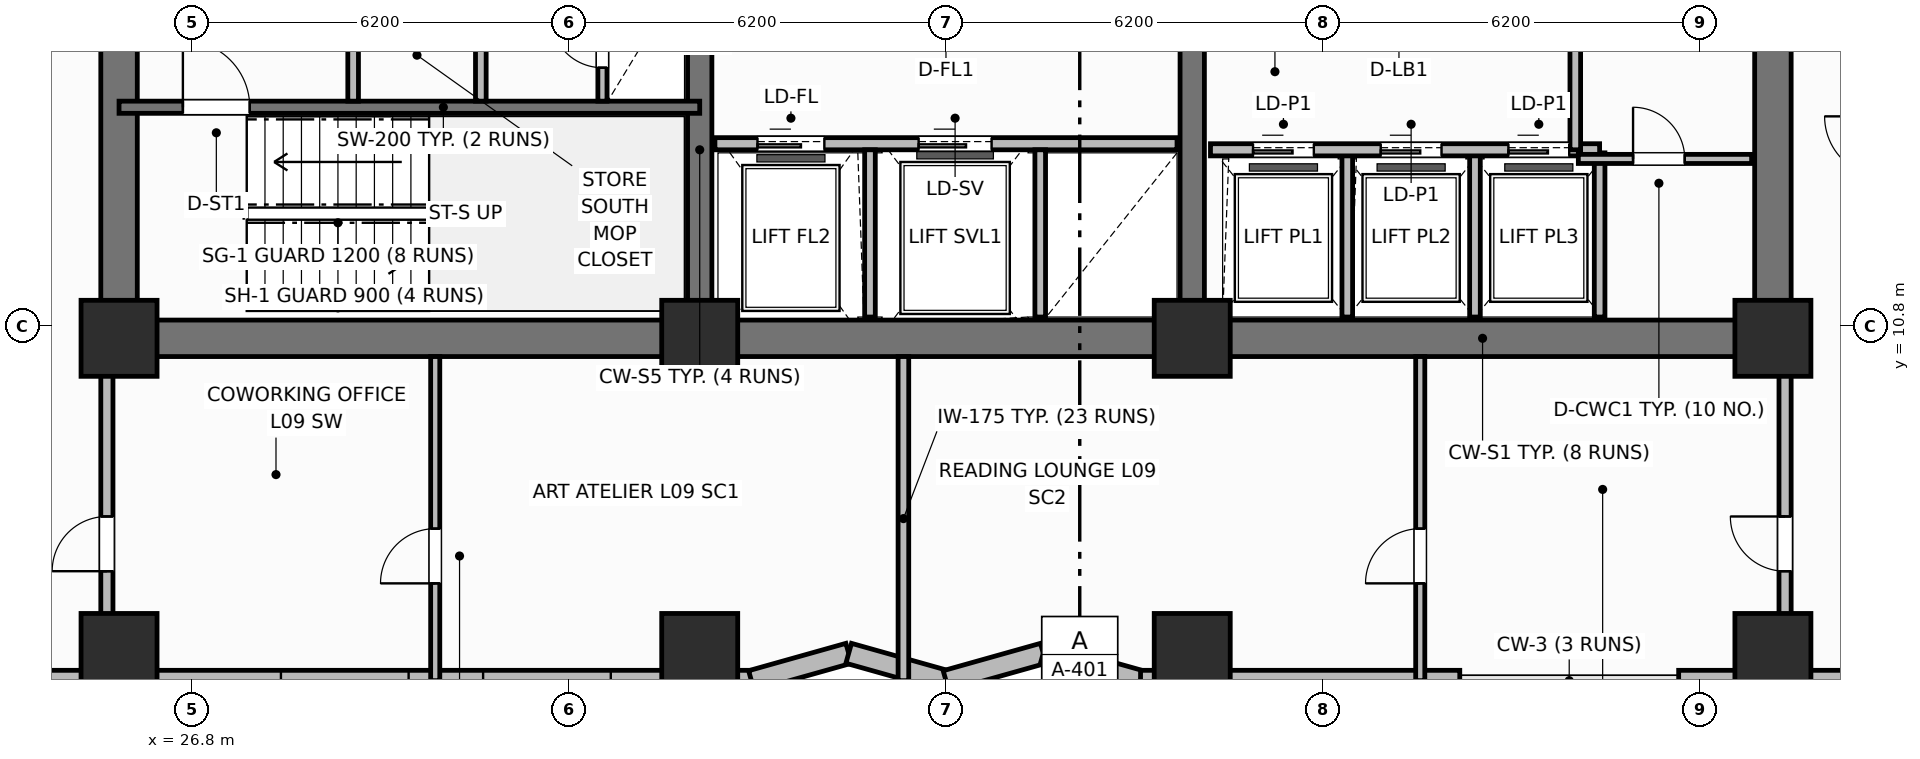
"""IFC4 building model, lengths in metres.
Left out: names, types, materials, properties, quantities, classifications, styles, units other than length and angle.
Written with IfcOpenShell. Run it as: python <this file> out.ifc"""

import sys

from ifc_helpers import new_model, si_unit, direction, frame, frame_2d, origin, origin_2d, place, context, subcontext, project, spatial, rectangle, extrude, element, fill, save


model = new_model("IFC4")
c1 = context("Model", 3, precision=1e-05, world=origin(), true_north=direction((0.0, 1.0)))
c2 = subcontext(c1, "Body", "Model", "MODEL_VIEW")
j1 = project(units=[si_unit("LENGTHUNIT", "METRE"), si_unit("PLANEANGLEUNIT", "RADIAN")], contexts=[c1])
p1 = place(None, origin())
s1 = spatial("IfcSite", under=j1, at=p1, CompositionType="ELEMENT")
p2 = place(p1, origin())
s2 = spatial("IfcBuilding", under=s1, at=p2, CompositionType="ELEMENT")
p3 = place(p2, frame((0.0, 0.0, 39.9)))
s3 = spatial("IfcBuildingStorey", under=s2, at=p3, CompositionType="ELEMENT", Elevation=39.9)
p4 = place(p3, frame((52.8, 10.6, 0.0), z_axis=(0.0, 0.0, 1.0), x_axis=(-1.0, 0.0, 0.0)))
e1 = element("IfcWall", 1, at=p4, inside=s3, PredefinedType="SHEAR", context=c2, shape_type="SweptSolid", body=[
    extrude(rectangle(XDim=27.2, YDim=0.6, at=frame_2d((13.6, 0.0))), origin(), (0.0, 0.0, 1.0), 3.7),
])
for number, where, z_axis, x_axis in (
    (2, (25.6, 10.9, 0.0), (0.0, 0.0, 1.0), (0.0, 1.0, 0.0)),
    (3, (52.8, 10.9, 0.0), (0.0, 0.0, 1.0), (0.0, 1.0, 0.0)),
):
    element("IfcWall", number, at=place(p3, frame(where, z_axis=z_axis, x_axis=x_axis)), inside=s3, PredefinedType="SHEAR", context=c2, shape_type="SweptSolid", body=[
        extrude(rectangle(XDim=5.6, YDim=0.6, at=frame_2d((2.8, 0.0))), origin(), (0.0, 0.0, 1.0), 3.7),
    ])
for number, where, z_axis, x_axis in (
    (4, (35.15, 10.9, 0.0), (0.0, 0.0, 1.0), (0.0, 1.0, 0.0)),
    (5, (43.25, 10.9, 0.0), (0.0, 0.0, 1.0), (0.0, 1.0, 0.0)),
):
    element("IfcWall", number, at=place(p3, frame(where, z_axis=z_axis, x_axis=x_axis)), inside=s3, PredefinedType="SHEAR", context=c2, shape_type="SweptSolid", body=[
        extrude(rectangle(XDim=5.6, YDim=0.4, at=frame_2d((2.8, 0.0))), origin(), (0.0, 0.0, 1.0), 3.7),
    ])
for number, where, z_axis, x_axis in (
    (6, (25.6, 10.6, 0.0), (0.0, 0.0, 1.0), (1.0, 0.0, 0.0)),
    (7, (35.15, 10.6, 0.0), (0.0, 0.0, 1.0), (1.0, 0.0, 0.0)),
    (8, (43.25, 10.6, 0.0), (0.0, 0.0, 1.0), (1.0, 0.0, 0.0)),
    (9, (52.8, 10.6, 0.0), (0.0, 0.0, 1.0), (1.0, 0.0, 0.0)),
    (10, (25.6, 5.45, 0.0), (0.0, 0.0, 1.0), (1.0, 0.0, 0.0)),
    (11, (35.15, 5.45, 0.0), (0.0, 0.0, 1.0), (1.0, 0.0, 0.0)),
    (12, (43.25, 5.45, 0.0), (0.0, 0.0, 1.0), (1.0, 0.0, 0.0)),
    (13, (52.8, 5.45, 0.0), (0.0, 0.0, 1.0), (1.0, 0.0, 0.0)),
):
    element("IfcColumn", number, at=place(p3, frame(where, z_axis=z_axis, x_axis=x_axis)), inside=s3, PredefinedType="COLUMN", context=c2, shape_type="SweptSolid", body=[
        extrude(rectangle(XDim=1.25, YDim=1.25, at=origin_2d()), origin(), (0.0, 0.0, 1.0), 3.7),
    ])
p5 = place(p3, frame((18.6, 4.97, 0.0), z_axis=(0.0, 0.0, 1.0), x_axis=(1.0, 0.0, 0.0)))
e14 = element("IfcWall", 14, at=p5, inside=s3, PredefinedType="SOLIDWALL", context=c2, shape_type="SweptSolid", body=[
    extrude(rectangle(XDim=17.4, YDim=0.34, at=frame_2d((8.7, 0.0))), origin(), (0.0, 0.0, 1.0), 2.7),
])
p6 = place(p5, frame((1.613, 0.0, 0.68)))
e15 = element("IfcOpeningElement", 15, at=p6, cuts=e14, PredefinedType="OPENING", context=c2, shape_type="SweptSolid", body=[
    extrude(rectangle(XDim=2.1, YDim=1.9, at=frame_2d((1.05, 0.95))), frame((0.0, 0.18, 0.0), z_axis=(0.0, -1.0, 0.0), x_axis=(1.0, 0.0, 0.0)), (0.0, 0.0, 1.0), 0.36),
])
p7 = place(p5, frame((9.663, 0.0, 0.68)))
e16 = element("IfcOpeningElement", 16, at=p7, cuts=e14, PredefinedType="OPENING", context=c2, shape_type="SweptSolid", body=[
    extrude(rectangle(XDim=2.1, YDim=1.9, at=frame_2d((1.05, 0.95))), frame((0.0, 0.18, 0.0), z_axis=(0.0, -1.0, 0.0), x_axis=(1.0, 0.0, 0.0)), (0.0, 0.0, 1.0), 0.36),
])
p8 = place(p5, frame((12.988, 0.0, 0.68)))
e17 = element("IfcOpeningElement", 17, at=p8, cuts=e14, PredefinedType="OPENING", context=c2, shape_type="SweptSolid", body=[
    extrude(rectangle(XDim=2.1, YDim=1.9, at=frame_2d((1.05, 0.95))), frame((0.0, 0.18, 0.0), z_axis=(0.0, -1.0, 0.0), x_axis=(1.0, 0.0, 0.0)), (0.0, 0.0, 1.0), 0.36),
])
p9 = place(p3, frame((36.0, 4.97, 0.0), z_axis=(0.0, 0.0, 1.0), x_axis=(0.962662902433, 0.270703040766, 0.0)))
e18 = element("IfcWall", 18, at=p9, inside=s3, PredefinedType="SOLIDWALL", context=c2, shape_type="SweptSolid", body=[
    extrude(rectangle(XDim=1.662, YDim=0.34, at=frame_2d((0.831, 0.0))), origin(), (0.0, 0.0, 1.0), 2.7),
])
p10 = place(p3, frame((37.6, 5.42, 0.0), z_axis=(0.0, 0.0, 1.0), x_axis=(0.962652136636, -0.270741322725, 0.0)))
e19 = element("IfcWall", 19, at=p10, inside=s3, PredefinedType="SOLIDWALL", context=c2, shape_type="SweptSolid", body=[
    extrude(rectangle(XDim=1.662, YDim=0.34, at=frame_2d((0.831, 0.0))), origin(), (0.0, 0.0, 1.0), 2.7),
])
p11 = place(p3, frame((39.2, 4.97, 0.0), z_axis=(0.0, 0.0, 1.0), x_axis=(0.962662902433, 0.270703040766, 0.0)))
e20 = element("IfcWall", 20, at=p11, inside=s3, PredefinedType="SOLIDWALL", context=c2, shape_type="SweptSolid", body=[
    extrude(rectangle(XDim=1.662, YDim=0.34, at=frame_2d((0.831, 0.0))), origin(), (0.0, 0.0, 1.0), 2.7),
])
p12 = place(p3, frame((40.8, 5.42, 0.0), z_axis=(0.0, 0.0, 1.0), x_axis=(0.962652136636, -0.270741322725, 0.0)))
e21 = element("IfcWall", 21, at=p12, inside=s3, PredefinedType="SOLIDWALL", context=c2, shape_type="SweptSolid", body=[
    extrude(rectangle(XDim=1.662, YDim=0.34, at=frame_2d((0.831, 0.0))), origin(), (0.0, 0.0, 1.0), 2.7),
])
p13 = place(p3, frame((42.4, 4.97, 0.0), z_axis=(0.0, 0.0, 1.0), x_axis=(1.0, 0.0, 0.0)))
e22 = element("IfcWall", 22, at=p13, inside=s3, PredefinedType="SOLIDWALL", context=c2, shape_type="SweptSolid", body=[
    extrude(rectangle(XDim=5.25, YDim=0.34, at=frame_2d((2.625, 0.0))), origin(), (0.0, 0.0, 1.0), 2.7),
])
p14 = place(p3, frame((51.25, 4.97, 0.0), z_axis=(0.0, 0.0, 1.0), x_axis=(1.0, 0.0, 0.0)))
e23 = element("IfcWall", 23, at=p14, inside=s3, PredefinedType="SOLIDWALL", context=c2, shape_type="SweptSolid", body=[
    extrude(rectangle(XDim=8.55, YDim=0.34, at=frame_2d((4.275, 0.0))), origin(), (0.0, 0.0, 1.0), 2.7),
])
p15 = place(p14, frame((5.038, 0.0, 0.68)))
e24 = element("IfcOpeningElement", 24, at=p15, cuts=e23, PredefinedType="OPENING", context=c2, shape_type="SweptSolid", body=[
    extrude(rectangle(XDim=2.1, YDim=1.9, at=frame_2d((1.05, 0.95))), frame((0.0, 0.18, 0.0), z_axis=(0.0, -1.0, 0.0), x_axis=(1.0, 0.0, 0.0)), (0.0, 0.0, 1.0), 0.36),
])
p16 = place(p3, frame((25.6, 14.4, 0.0), z_axis=(0.0, 0.0, 1.0), x_axis=(1.0, 0.0, 0.0)))
e25 = element("IfcWall", 25, at=p16, inside=s3, PredefinedType="SHEAR", context=c2, shape_type="SweptSolid", body=[
    extrude(rectangle(XDim=9.55, YDim=0.2, at=frame_2d((4.775, 0.0))), origin(), (0.0, 0.0, 1.0), 3.7),
])
p17 = place(p16, frame((1.05, 0.0, 0.0)))
e26 = element("IfcOpeningElement", 26, at=p17, cuts=e25, PredefinedType="OPENING", context=c2, shape_type="SweptSolid", body=[
    extrude(rectangle(XDim=1.1, YDim=2.15, at=frame_2d((0.55, 1.075))), frame((0.0, 0.11, 0.0), z_axis=(0.0, -1.0, 0.0), x_axis=(1.0, 0.0, 0.0)), (0.0, 0.0, 1.0), 0.22),
])
for number, where, z_axis, x_axis in (
    (27, (29.45, 14.5, 0.0), (0.0, 0.0, 1.0), (0.0, 1.0, 0.0)),
    (28, (31.55, 14.5, 0.0), (0.0, 0.0, 1.0), (0.0, 1.0, 0.0)),
):
    element("IfcWall", number, at=place(p3, frame(where, z_axis=z_axis, x_axis=x_axis)), inside=s3, PredefinedType="PARTITIONING", context=c2, shape_type="SweptSolid", body=[
        extrude(rectangle(XDim=2.08, YDim=0.175, at=frame_2d((1.04, 0.0))), origin(), (0.0, 0.0, 1.0), 2.53),
    ])
p18 = place(p3, frame((33.55, 14.5, 0.0), z_axis=(0.0, 0.0, 1.0), x_axis=(0.0, 1.0, 0.0)))
e29 = element("IfcWall", 29, at=p18, inside=s3, PredefinedType="PARTITIONING", context=c2, shape_type="SweptSolid", body=[
    extrude(rectangle(XDim=2.08, YDim=0.15, at=frame_2d((1.04, 0.0))), origin(), (0.0, 0.0, 1.0), 2.53),
])
p19 = place(p18, frame((0.55, 0.0, 0.0)))
e30 = element("IfcOpeningElement", 30, at=p19, cuts=e29, PredefinedType="OPENING", context=c2, shape_type="SweptSolid", body=[
    extrude(rectangle(XDim=0.85, YDim=2.05, at=frame_2d((0.425, 1.025))), frame((0.0, 0.085, 0.0), z_axis=(0.0, -1.0, 0.0), x_axis=(1.0, 0.0, 0.0)), (0.0, 0.0, 1.0), 0.17),
])
p20 = place(p3, frame((35.4, 13.8, 0.0), z_axis=(0.0, 0.0, 1.0), x_axis=(1.0, 0.0, 0.0)))
e31 = element("IfcWall", 31, at=p20, inside=s3, PredefinedType="PARTITIONING", context=c2, shape_type="SweptSolid", body=[
    extrude(rectangle(XDim=7.6, YDim=0.2, at=frame_2d((3.8, 0.0))), origin(), (0.0, 0.0, 1.0), 2.3),
])
p21 = place(p20, frame((0.7, 0.0, 0.0)))
e32 = element("IfcOpeningElement", 32, at=p21, cuts=e31, PredefinedType="OPENING", context=c2, shape_type="SweptSolid", body=[
    extrude(rectangle(XDim=1.1, YDim=2.15, at=frame_2d((0.55, 1.075))), frame((0.0, 0.11, 0.0), z_axis=(0.0, -1.0, 0.0), x_axis=(1.0, 0.0, 0.0)), (0.0, 0.0, 1.0), 0.22),
])
p22 = place(p20, frame((3.35, 0.0, 0.0)))
e33 = element("IfcOpeningElement", 33, at=p22, cuts=e31, PredefinedType="OPENING", context=c2, shape_type="SweptSolid", body=[
    extrude(rectangle(XDim=1.2, YDim=2.15, at=frame_2d((0.6, 1.075))), frame((0.0, 0.11, 0.0), z_axis=(0.0, -1.0, 0.0), x_axis=(1.0, 0.0, 0.0)), (0.0, 0.0, 1.0), 0.22),
])
for number, where, z_axis, x_axis in (
    (34, (37.95, 10.95, 0.0), (0.0, 0.0, 1.0), (0.0, 1.0, 0.0)),
    (35, (40.75, 10.95, 0.0), (0.0, 0.0, 1.0), (0.0, 1.0, 0.0)),
):
    element("IfcWall", number, at=place(p3, frame(where, z_axis=z_axis, x_axis=x_axis)), inside=s3, PredefinedType="PARTITIONING", context=c2, shape_type="SweptSolid", body=[
        extrude(rectangle(XDim=2.75, YDim=0.175, at=frame_2d((1.375, 0.0))), origin(), (0.0, 0.0, 1.0), 2.53),
    ])
for number, where, z_axis, x_axis in (
    (36, (45.8, 10.95, 0.0), (0.0, 0.0, 1.0), (0.0, 1.0, 0.0)),
    (37, (47.9, 10.95, 0.0), (0.0, 0.0, 1.0), (0.0, 1.0, 0.0)),
    (38, (49.95, 10.95, 0.0), (0.0, 0.0, 1.0), (0.0, 1.0, 0.0)),
):
    element("IfcWall", number, at=place(p3, frame(where, z_axis=z_axis, x_axis=x_axis)), inside=s3, PredefinedType="PARTITIONING", context=c2, shape_type="SweptSolid", body=[
        extrude(rectangle(XDim=2.7, YDim=0.175, at=frame_2d((1.35, 0.0))), origin(), (0.0, 0.0, 1.0), 2.53),
    ])
p23 = place(p3, frame((43.55, 13.7, 0.0), z_axis=(0.0, 0.0, 1.0), x_axis=(1.0, 0.0, 0.0)))
e39 = element("IfcWall", 39, at=p23, inside=s3, PredefinedType="PARTITIONING", context=c2, shape_type="SweptSolid", body=[
    extrude(rectangle(XDim=6.4, YDim=0.2, at=frame_2d((3.2, 0.0))), origin(), (0.0, 0.0, 1.0), 2.53),
])
p24 = place(p23, frame((0.7, 0.0, 0.0)))
e40 = element("IfcOpeningElement", 40, at=p24, cuts=e39, PredefinedType="OPENING", context=c2, shape_type="SweptSolid", body=[
    extrude(rectangle(XDim=1.0, YDim=2.15, at=frame_2d((0.5, 1.075))), frame((0.0, 0.11, 0.0), z_axis=(0.0, -1.0, 0.0), x_axis=(1.0, 0.0, 0.0)), (0.0, 0.0, 1.0), 0.22),
])
p25 = place(p23, frame((2.8, 0.0, 0.0)))
e41 = element("IfcOpeningElement", 41, at=p25, cuts=e39, PredefinedType="OPENING", context=c2, shape_type="SweptSolid", body=[
    extrude(rectangle(XDim=1.0, YDim=2.15, at=frame_2d((0.5, 1.075))), frame((0.0, 0.11, 0.0), z_axis=(0.0, -1.0, 0.0), x_axis=(1.0, 0.0, 0.0)), (0.0, 0.0, 1.0), 0.22),
])
p26 = place(p23, frame((4.9, 0.0, 0.0)))
e42 = element("IfcOpeningElement", 42, at=p26, cuts=e39, PredefinedType="OPENING", context=c2, shape_type="SweptSolid", body=[
    extrude(rectangle(XDim=1.0, YDim=2.15, at=frame_2d((0.5, 1.075))), frame((0.0, 0.11, 0.0), z_axis=(0.0, -1.0, 0.0), x_axis=(1.0, 0.0, 0.0)), (0.0, 0.0, 1.0), 0.22),
])
p27 = place(p3, frame((49.55, 13.7, 0.0), z_axis=(0.0, 0.0, 1.0), x_axis=(0.0, 1.0, 0.0)))
e43 = element("IfcWall", 43, at=p27, inside=s3, PredefinedType="PARTITIONING", context=c2, shape_type="SweptSolid", body=[
    extrude(rectangle(XDim=2.88, YDim=0.175, at=frame_2d((1.44, 0.0))), origin(), (0.0, 0.0, 1.0), 2.53),
])
p28 = place(p3, frame((49.6, 13.55, 0.0), z_axis=(0.0, 0.0, 1.0), x_axis=(1.0, 0.0, 0.0)))
e44 = element("IfcWall", 44, at=p28, inside=s3, PredefinedType="PARTITIONING", context=c2, shape_type="SweptSolid", body=[
    extrude(rectangle(XDim=2.85, YDim=0.15, at=frame_2d((1.425, 0.0))), origin(), (0.0, 0.0, 1.0), 2.53),
])
p29 = place(p28, frame((0.9, 0.0, 0.0)))
e45 = element("IfcOpeningElement", 45, at=p29, cuts=e44, PredefinedType="OPENING", context=c2, shape_type="SweptSolid", body=[
    extrude(rectangle(XDim=0.85, YDim=2.1, at=frame_2d((0.425, 1.05))), frame((0.0, 0.085, 0.0), z_axis=(0.0, -1.0, 0.0), x_axis=(1.0, 0.0, 0.0)), (0.0, 0.0, 1.0), 0.17),
])
p30 = place(p3, frame((30.8, 4.97, 0.0), z_axis=(0.0, 0.0, 1.0), x_axis=(0.0, 1.0, 0.0)))
e46 = element("IfcWall", 46, at=p30, inside=s3, PredefinedType="PARTITIONING", context=c2, shape_type="SweptSolid", body=[
    extrude(rectangle(XDim=5.33, YDim=0.15, at=frame_2d((2.665, 0.0))), origin(), (0.0, 0.0, 1.0), 2.53),
])
p31 = place(p30, frame((1.6, 0.0, 0.0)))
e47 = element("IfcOpeningElement", 47, at=p31, cuts=e46, PredefinedType="OPENING", context=c2, shape_type="SweptSolid", body=[
    extrude(rectangle(XDim=0.9, YDim=2.1, at=frame_2d((0.45, 1.05))), frame((0.0, 0.085, 0.0), z_axis=(0.0, -1.0, 0.0), x_axis=(1.0, 0.0, 0.0)), (0.0, 0.0, 1.0), 0.17),
])
p32 = place(p3, frame((38.5, 4.97, 0.0), z_axis=(0.0, 0.0, 1.0), x_axis=(0.0, 1.0, 0.0)))
e48 = element("IfcWall", 48, at=p32, inside=s3, PredefinedType="PARTITIONING", context=c2, shape_type="SweptSolid", body=[
    extrude(rectangle(XDim=5.33, YDim=0.175, at=frame_2d((2.665, 0.0))), origin(), (0.0, 0.0, 1.0), 2.53),
])
p33 = place(p3, frame((47.0, 4.97, 0.0), z_axis=(0.0, 0.0, 1.0), x_axis=(0.0, 1.0, 0.0)))
e49 = element("IfcWall", 49, at=p33, inside=s3, PredefinedType="PARTITIONING", context=c2, shape_type="SweptSolid", body=[
    extrude(rectangle(XDim=5.33, YDim=0.15, at=frame_2d((2.665, 0.0))), origin(), (0.0, 0.0, 1.0), 2.53),
])
p34 = place(p33, frame((1.6, 0.0, 0.0)))
e50 = element("IfcOpeningElement", 50, at=p34, cuts=e49, PredefinedType="OPENING", context=c2, shape_type="SweptSolid", body=[
    extrude(rectangle(XDim=0.9, YDim=2.1, at=frame_2d((0.45, 1.05))), frame((0.0, 0.085, 0.0), z_axis=(0.0, -1.0, 0.0), x_axis=(1.0, 0.0, 0.0)), (0.0, 0.0, 1.0), 0.17),
])
p35 = place(p3, frame((25.4, 5.92, 0.0), z_axis=(0.0, 0.0, 1.0), x_axis=(0.0, 1.0, 0.0)))
e51 = element("IfcWall", 51, at=p35, inside=s3, PredefinedType="PARTITIONING", context=c2, shape_type="SweptSolid", body=[
    extrude(rectangle(XDim=4.38, YDim=0.2, at=frame_2d((2.19, 0.0))), origin(), (0.0, 0.0, 1.0), 2.53),
])
p36 = place(p35, frame((0.85, 0.0, 0.0)))
e52 = element("IfcOpeningElement", 52, at=p36, cuts=e51, PredefinedType="OPENING", context=c2, shape_type="SweptSolid", body=[
    extrude(rectangle(XDim=0.9, YDim=2.1, at=frame_2d((0.45, 1.05))), frame((0.0, 0.11, 0.0), z_axis=(0.0, -1.0, 0.0), x_axis=(1.0, 0.0, 0.0)), (0.0, 0.0, 1.0), 0.22),
])
p37 = place(p3, frame((53.0, 5.92, 0.0), z_axis=(0.0, 0.0, 1.0), x_axis=(0.0, 1.0, 0.0)))
e53 = element("IfcWall", 53, at=p37, inside=s3, PredefinedType="PARTITIONING", context=c2, shape_type="SweptSolid", body=[
    extrude(rectangle(XDim=4.38, YDim=0.2, at=frame_2d((2.19, 0.0))), origin(), (0.0, 0.0, 1.0), 2.53),
])
p38 = place(p37, frame((0.85, 0.0, 0.0)))
e54 = element("IfcOpeningElement", 54, at=p38, cuts=e53, PredefinedType="OPENING", context=c2, shape_type="SweptSolid", body=[
    extrude(rectangle(XDim=0.9, YDim=2.1, at=frame_2d((0.45, 1.05))), frame((0.0, 0.11, 0.0), z_axis=(0.0, -1.0, 0.0), x_axis=(1.0, 0.0, 0.0)), (0.0, 0.0, 1.0), 0.22),
])
p39 = place(p7, origin())
e55 = element("IfcWindow", 55, at=p39, inside=s3, PartitioningType="SINGLE_PANEL", PredefinedType="WINDOW", context=c2, shape_type="SweptSolid", body=[
    extrude(rectangle(XDim=2.1, YDim=1.9, at=frame_2d((1.05, 0.95))), frame((0.0, 0.03, 0.0), z_axis=(0.0, -1.0, 0.0), x_axis=(1.0, 0.0, 0.0)), (0.0, 0.0, 1.0), 0.06),
])
fill(e16, e55)
p40 = place(p8, origin())
e56 = element("IfcWindow", 56, at=p40, inside=s3, PartitioningType="SINGLE_PANEL", PredefinedType="WINDOW", context=c2, shape_type="SweptSolid", body=[
    extrude(rectangle(XDim=2.1, YDim=1.9, at=frame_2d((1.05, 0.95))), frame((0.0, 0.03, 0.0), z_axis=(0.0, -1.0, 0.0), x_axis=(1.0, 0.0, 0.0)), (0.0, 0.0, 1.0), 0.06),
])
fill(e17, e56)
p41 = place(p17, origin())
e57 = element("IfcDoor", 57, at=p41, inside=s3, OperationType="SINGLE_SWING_LEFT", PredefinedType="DOOR", context=c2, shape_type="SweptSolid", body=[
    extrude(rectangle(XDim=1.1, YDim=2.15, at=frame_2d((0.55, 1.075))), frame((0.0, 0.025, 0.0), z_axis=(0.0, -1.0, 0.0), x_axis=(1.0, 0.0, 0.0)), (0.0, 0.0, 1.0), 0.05),
])
fill(e26, e57)
p42 = place(p19, origin())
e58 = element("IfcDoor", 58, at=p42, inside=s3, OperationType="SINGLE_SWING_RIGHT", PredefinedType="TRAPDOOR", context=c2, shape_type="SweptSolid", body=[
    extrude(rectangle(XDim=0.85, YDim=2.05, at=frame_2d((0.425, 1.025))), frame((0.0, 0.025, 0.0), z_axis=(0.0, -1.0, 0.0), x_axis=(1.0, 0.0, 0.0)), (0.0, 0.0, 1.0), 0.05),
])
fill(e30, e58)
p43 = place(p21, origin())
e59 = element("IfcDoor", 59, at=p43, inside=s3, OperationType="SLIDING_TO_LEFT", PredefinedType="DOOR", context=c2, shape_type="SweptSolid", body=[
    extrude(rectangle(XDim=1.1, YDim=2.15, at=frame_2d((0.55, 1.075))), frame((0.0, 0.025, 0.0), z_axis=(0.0, -1.0, 0.0), x_axis=(1.0, 0.0, 0.0)), (0.0, 0.0, 1.0), 0.05),
])
fill(e32, e59)
p44 = place(p22, origin())
e60 = element("IfcDoor", 60, at=p44, inside=s3, OperationType="SLIDING_TO_LEFT", PredefinedType="DOOR", context=c2, shape_type="SweptSolid", body=[
    extrude(rectangle(XDim=1.2, YDim=2.15, at=frame_2d((0.6, 1.075))), frame((0.0, 0.025, 0.0), z_axis=(0.0, -1.0, 0.0), x_axis=(1.0, 0.0, 0.0)), (0.0, 0.0, 1.0), 0.05),
])
fill(e33, e60)
p45 = place(p24, origin())
e61 = element("IfcDoor", 61, at=p45, inside=s3, OperationType="SLIDING_TO_LEFT", PredefinedType="DOOR", context=c2, shape_type="SweptSolid", body=[
    extrude(rectangle(XDim=1.0, YDim=2.15, at=frame_2d((0.5, 1.075))), frame((0.0, 0.025, 0.0), z_axis=(0.0, -1.0, 0.0), x_axis=(1.0, 0.0, 0.0)), (0.0, 0.0, 1.0), 0.05),
])
fill(e40, e61)
p46 = place(p25, origin())
e62 = element("IfcDoor", 62, at=p46, inside=s3, OperationType="SLIDING_TO_LEFT", PredefinedType="DOOR", context=c2, shape_type="SweptSolid", body=[
    extrude(rectangle(XDim=1.0, YDim=2.15, at=frame_2d((0.5, 1.075))), frame((0.0, 0.025, 0.0), z_axis=(0.0, -1.0, 0.0), x_axis=(1.0, 0.0, 0.0)), (0.0, 0.0, 1.0), 0.05),
])
fill(e41, e62)
p47 = place(p26, origin())
e63 = element("IfcDoor", 63, at=p47, inside=s3, OperationType="SLIDING_TO_LEFT", PredefinedType="DOOR", context=c2, shape_type="SweptSolid", body=[
    extrude(rectangle(XDim=1.0, YDim=2.15, at=frame_2d((0.5, 1.075))), frame((0.0, 0.025, 0.0), z_axis=(0.0, -1.0, 0.0), x_axis=(1.0, 0.0, 0.0)), (0.0, 0.0, 1.0), 0.05),
])
fill(e42, e63)
p48 = place(p29, origin())
e64 = element("IfcDoor", 64, at=p48, inside=s3, OperationType="SINGLE_SWING_LEFT", PredefinedType="DOOR", context=c2, shape_type="SweptSolid", body=[
    extrude(rectangle(XDim=0.85, YDim=2.1, at=frame_2d((0.425, 1.05))), frame((0.0, 0.025, 0.0), z_axis=(0.0, -1.0, 0.0), x_axis=(1.0, 0.0, 0.0)), (0.0, 0.0, 1.0), 0.05),
])
fill(e45, e64)
p49 = place(p31, origin())
e65 = element("IfcDoor", 65, at=p49, inside=s3, OperationType="SINGLE_SWING_LEFT", PredefinedType="DOOR", context=c2, shape_type="SweptSolid", body=[
    extrude(rectangle(XDim=0.9, YDim=2.1, at=frame_2d((0.45, 1.05))), frame((0.0, 0.025, 0.0), z_axis=(0.0, -1.0, 0.0), x_axis=(1.0, 0.0, 0.0)), (0.0, 0.0, 1.0), 0.05),
])
fill(e47, e65)
p50 = place(p34, origin())
e66 = element("IfcDoor", 66, at=p50, inside=s3, OperationType="SINGLE_SWING_LEFT", PredefinedType="DOOR", context=c2, shape_type="SweptSolid", body=[
    extrude(rectangle(XDim=0.9, YDim=2.1, at=frame_2d((0.45, 1.05))), frame((0.0, 0.025, 0.0), z_axis=(0.0, -1.0, 0.0), x_axis=(1.0, 0.0, 0.0)), (0.0, 0.0, 1.0), 0.05),
])
fill(e50, e66)
p51 = place(p36, origin())
e67 = element("IfcDoor", 67, at=p51, inside=s3, OperationType="SINGLE_SWING_LEFT", PredefinedType="DOOR", context=c2, shape_type="SweptSolid", body=[
    extrude(rectangle(XDim=0.9, YDim=2.1, at=frame_2d((0.45, 1.05))), frame((0.0, 0.025, 0.0), z_axis=(0.0, -1.0, 0.0), x_axis=(1.0, 0.0, 0.0)), (0.0, 0.0, 1.0), 0.05),
])
fill(e52, e67)
p52 = place(p38, origin())
e68 = element("IfcDoor", 68, at=p52, inside=s3, OperationType="SINGLE_SWING_RIGHT", PredefinedType="DOOR", context=c2, shape_type="SweptSolid", body=[
    extrude(rectangle(XDim=0.9, YDim=2.1, at=frame_2d((0.45, 1.05))), frame((0.0, 0.025, 0.0), z_axis=(0.0, -1.0, 0.0), x_axis=(1.0, 0.0, 0.0)), (0.0, 0.0, 1.0), 0.05),
])
fill(e54, e68)
save(model, sys.argv[1])
